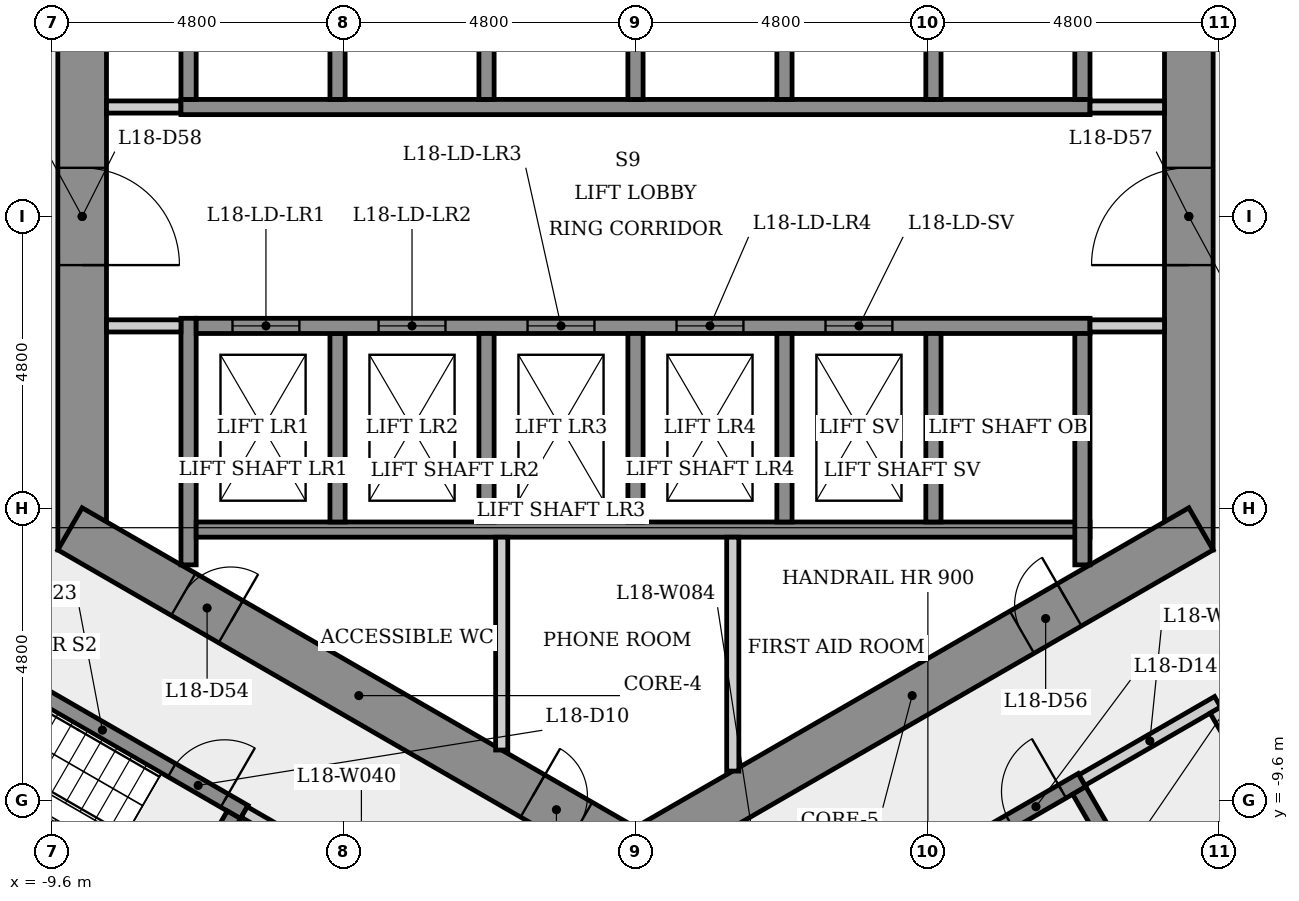
"""IFC4 building model, lengths in metres.
Left out: names, types, materials, properties, quantities, classifications, styles, units other than length and angle.
Written with IfcOpenShell. Run it as: python <this file> out.ifc"""

import sys

from ifc_helpers import new_model, si_unit, direction, frame, frame_2d, origin, place, context, subcontext, project, spatial, rectangle, extrude, element, fill, save


model = new_model("IFC4")
c1 = context("Model", 3, precision=1e-05, world=origin(), true_north=direction((0.0, 1.0)))
c2 = subcontext(c1, "Body", "Model", "MODEL_VIEW")
j1 = project(units=[si_unit("LENGTHUNIT", "METRE"), si_unit("PLANEANGLEUNIT", "RADIAN")], contexts=[c1])
p1 = place(None, origin())
s1 = spatial("IfcSite", under=j1, at=p1, CompositionType="ELEMENT")
p2 = place(p1, origin())
s2 = spatial("IfcBuilding", under=s1, at=p2, CompositionType="ELEMENT")
p3 = place(p2, frame((0.0, 0.0, 70.3)))
s3 = spatial("IfcBuildingStorey", under=s2, at=p3, CompositionType="ELEMENT", Elevation=70.3)
p4 = place(p3, frame((9.1, -5.485, 0.0), z_axis=(0.0, 0.0, 1.0), x_axis=(0.0, 1.0, 0.0)))
e1 = element("IfcWall", 1, at=p4, inside=s3, PredefinedType="SHEAR", context=c2, shape_type="SweptSolid", body=[
    extrude(rectangle(XDim=10.97, YDim=0.8, at=frame_2d((5.485, 0.0))), origin(), (0.0, 0.0, 1.0), 4.0),
])
p5 = place(p4, frame((4.685, 0.0, 0.0)))
e2 = element("IfcOpeningElement", 2, at=p5, cuts=e1, PredefinedType="OPENING", context=c2, shape_type="SweptSolid", body=[
    extrude(rectangle(XDim=1.6, YDim=2.1, at=frame_2d((0.8, 1.05))), frame((0.0, 0.41, 0.0), z_axis=(0.0, -1.0, 0.0), x_axis=(1.0, 0.0, 0.0)), (0.0, 0.0, 1.0), 0.82),
])
p6 = place(p3, frame((-9.1, 5.485, 0.0), z_axis=(0.0, 0.0, 1.0), x_axis=(0.0, -1.0, 0.0)))
e3 = element("IfcWall", 3, at=p6, inside=s3, PredefinedType="SHEAR", context=c2, shape_type="SweptSolid", body=[
    extrude(rectangle(XDim=10.97, YDim=0.8, at=frame_2d((5.485, 0.0))), origin(), (0.0, 0.0, 1.0), 4.0),
])
p7 = place(p6, frame((4.685, 0.0, 0.0)))
e4 = element("IfcOpeningElement", 4, at=p7, cuts=e3, PredefinedType="OPENING", context=c2, shape_type="SweptSolid", body=[
    extrude(rectangle(XDim=1.6, YDim=2.1, at=frame_2d((0.8, 1.05))), frame((0.0, 0.41, 0.0), z_axis=(0.0, -1.0, 0.0), x_axis=(1.0, 0.0, 0.0)), (0.0, 0.0, 1.0), 0.82),
])
p8 = place(p3, frame((-9.3, -5.138, 0.0), z_axis=(0.0, 0.0, 1.0), x_axis=(0.866023993627, -0.500002442456, 0.0)))
e5 = element("IfcWall", 5, at=p8, inside=s3, PredefinedType="SHEAR", context=c2, shape_type="SweptSolid", body=[
    extrude(rectangle(XDim=10.97, YDim=0.8, at=frame_2d((5.485, 0.0))), origin(), (0.0, 0.0, 1.0), 4.0),
])
p9 = place(p8, frame((2.153, 0.0, 0.0)))
e6 = element("IfcOpeningElement", 6, at=p9, cuts=e5, PredefinedType="OPENING", context=c2, shape_type="SweptSolid", body=[
    extrude(rectangle(XDim=0.9, YDim=2.1, at=frame_2d((0.45, 1.05))), frame((0.0, 0.41, 0.0), z_axis=(0.0, -1.0, 0.0), x_axis=(1.0, 0.0, 0.0)), (0.0, 0.0, 1.0), 0.82),
])
p10 = place(p8, frame((8.787, 0.0, 0.0)))
e7 = element("IfcOpeningElement", 7, at=p10, cuts=e5, PredefinedType="OPENING", context=c2, shape_type="SweptSolid", body=[
    extrude(rectangle(XDim=0.9, YDim=2.1, at=frame_2d((0.45, 1.05))), frame((0.0, 0.41, 0.0), z_axis=(0.0, -1.0, 0.0), x_axis=(1.0, 0.0, 0.0)), (0.0, 0.0, 1.0), 0.82),
])
p11 = place(p3, frame((-0.2, -10.623, 0.0), z_axis=(0.0, 0.0, 1.0), x_axis=(0.866023993627, 0.500002442456, 0.0)))
e8 = element("IfcWall", 8, at=p11, inside=s3, PredefinedType="SHEAR", context=c2, shape_type="SweptSolid", body=[
    extrude(rectangle(XDim=10.97, YDim=0.8, at=frame_2d((5.485, 0.0))), origin(), (0.0, 0.0, 1.0), 4.0),
])
p12 = place(p11, frame((7.57, 0.0, 0.0)))
e9 = element("IfcOpeningElement", 9, at=p12, cuts=e8, PredefinedType="OPENING", context=c2, shape_type="SweptSolid", body=[
    extrude(rectangle(XDim=0.9, YDim=2.1, at=frame_2d((0.45, 1.05))), frame((0.0, 0.41, 0.0), z_axis=(0.0, -1.0, 0.0), x_axis=(1.0, 0.0, 0.0)), (0.0, 0.0, 1.0), 0.82),
])
p13 = place(p3, frame((-11.1, -7.101, 0.0), z_axis=(0.0, 0.0, 1.0), x_axis=(0.866028615007, -0.499994437958, 0.0)))
e10 = element("IfcWall", 10, at=p13, inside=s3, PredefinedType="SHEAR", context=c2, shape_type="SweptSolid", body=[
    extrude(rectangle(XDim=5.387, YDim=0.25, at=frame_2d((2.694, 0.0))), origin(), (0.0, 0.0, 1.0), 3.6),
])
p14 = place(p13, frame((4.012, 0.0, 0.0)))
e11 = element("IfcOpeningElement", 11, at=p14, cuts=e10, PredefinedType="OPENING", context=c2, shape_type="SweptSolid", body=[
    extrude(rectangle(XDim=1.0, YDim=2.1, at=frame_2d((0.5, 1.05))), frame((0.0, 0.135, 0.0), z_axis=(0.0, -1.0, 0.0), x_axis=(1.0, 0.0, 0.0)), (0.0, 0.0, 1.0), 0.27),
])
p15 = place(p3, frame((-8.7, 1.8, 0.0), z_axis=(0.0, 0.0, 1.0), x_axis=(1.0, 0.0, 0.0)))
e12 = element("IfcWall", 12, at=p15, inside=s3, PredefinedType="PARTITIONING", context=c2, shape_type="SweptSolid", body=[
    extrude(rectangle(XDim=1.225, YDim=0.2, at=frame_2d((0.613, 0.0))), origin(), (0.0, 0.0, 1.0), 3.6),
])
p16 = place(p3, frame((-7.935, -12.393, 0.0), z_axis=(0.0, 0.0, 1.0), x_axis=(-0.866025499775, 0.499999833739, 0.0)))
e13 = element("IfcWall", 13, at=p16, inside=s3, PredefinedType="SHEAR", context=c2, shape_type="SweptSolid", body=[
    extrude(rectangle(XDim=6.4, YDim=0.25, at=frame_2d((3.2, 0.0))), origin(), (0.0, 0.0, 1.0), 3.6),
])
p17 = place(p3, frame((-7.475, 1.8, 0.0), z_axis=(0.0, 0.0, 1.0), x_axis=(1.0, 0.0, 0.0)))
e14 = element("IfcWall", 14, at=p17, inside=s3, PredefinedType="SHEAR", context=c2, shape_type="SweptSolid", body=[
    extrude(rectangle(XDim=14.95, YDim=0.25, at=frame_2d((7.475, 0.0))), origin(), (0.0, 0.0, 1.0), 3.6),
])
p18 = place(p3, frame((-7.35, -5.73, 0.0), z_axis=(0.0, 0.0, 1.0), x_axis=(0.0, 1.0, 0.0)))
e15 = element("IfcWall", 15, at=p18, inside=s3, PredefinedType="SHEAR", context=c2, shape_type="SweptSolid", body=[
    extrude(rectangle(XDim=4.055, YDim=0.25, at=frame_2d((2.028, 0.0))), origin(), (0.0, 0.0, 1.0), 3.6),
])
p19 = place(p3, frame((-7.35, 1.925, 0.0), z_axis=(0.0, 0.0, 1.0), x_axis=(0.0, 1.0, 0.0)))
e16 = element("IfcWall", 16, at=p19, inside=s3, PredefinedType="SHEAR", context=c2, shape_type="SweptSolid", body=[
    extrude(rectangle(XDim=3.805, YDim=0.25, at=frame_2d((1.903, 0.0))), origin(), (0.0, 0.0, 1.0), 3.6),
])
p20 = place(p3, frame((-7.475, -1.8, 0.0), z_axis=(0.0, 0.0, 1.0), x_axis=(-1.0, 0.0, 0.0)))
e17 = element("IfcWall", 17, at=p20, inside=s3, PredefinedType="PARTITIONING", context=c2, shape_type="SweptSolid", body=[
    extrude(rectangle(XDim=1.225, YDim=0.2, at=frame_2d((0.613, 0.0))), origin(), (0.0, 0.0, 1.0), 3.6),
])
p21 = place(p3, frame((-6.605, -9.841, 0.0), z_axis=(0.0, 0.0, 1.0), x_axis=(-0.499996545922, -0.866027397988, 0.0)))
e18 = element("IfcWall", 18, at=p21, inside=s3, PredefinedType="SHEAR", context=c2, shape_type="SweptSolid", body=[
    extrude(rectangle(XDim=2.75, YDim=0.25, at=frame_2d((1.375, 0.0))), origin(), (0.0, 0.0, 1.0), 3.6),
])
p22 = place(p21, frame((0.875, 0.0, 0.0)))
e19 = element("IfcOpeningElement", 19, at=p22, cuts=e18, PredefinedType="OPENING", context=c2, shape_type="SweptSolid", body=[
    extrude(rectangle(XDim=1.0, YDim=2.1, at=frame_2d((0.5, 1.05))), frame((0.0, 0.135, 0.0), z_axis=(0.0, -1.0, 0.0), x_axis=(1.0, 0.0, 0.0)), (0.0, 0.0, 1.0), 0.27),
])
p23 = place(p3, frame((-6.435, -9.795, 0.0), z_axis=(0.0, 0.0, 1.0), x_axis=(0.866012907634, -0.500021643343, 0.0)))
e20 = element("IfcWall", 20, at=p23, inside=s3, PredefinedType="PARTITIONING", context=c2, shape_type="SweptSolid", body=[
    extrude(rectangle(XDim=4.45, YDim=0.2, at=frame_2d((2.225, 0.0))), origin(), (0.0, 0.0, 1.0), 3.6),
])
p24 = place(p23, frame((1.675, 0.0, 0.0)))
e21 = element("IfcOpeningElement", 21, at=p24, cuts=e20, PredefinedType="OPENING", context=c2, shape_type="SweptSolid", body=[
    extrude(rectangle(XDim=1.1, YDim=2.1, at=frame_2d((0.55, 1.05))), frame((0.0, 0.11, 0.0), z_axis=(0.0, -1.0, 0.0), x_axis=(1.0, 0.0, 0.0)), (0.0, 0.0, 1.0), 0.22),
])
p25 = place(p3, frame((-7.225, -5.15, 0.0), z_axis=(0.0, 0.0, 1.0), x_axis=(1.0, 0.0, 0.0)))
e22 = element("IfcWall", 22, at=p25, inside=s3, PredefinedType="SHEAR", context=c2, shape_type="SweptSolid", body=[
    extrude(rectangle(XDim=14.7, YDim=0.25, at=frame_2d((7.35, 0.0))), origin(), (0.0, 0.0, 1.0), 3.6),
])
for number, where, z_axis, x_axis in (
    (23, (-4.9, -1.925, 0.0), (0.0, 0.0, 1.0), (0.0, -1.0, 0.0)),
    (24, (-4.9, 5.025, 0.0), (0.0, 0.0, 1.0), (0.0, -1.0, 0.0)),
):
    element("IfcWall", number, at=place(p3, frame(where, z_axis=z_axis, x_axis=x_axis)), inside=s3, PredefinedType="SHEAR", context=c2, shape_type="SweptSolid", body=[
        extrude(rectangle(XDim=3.1, YDim=0.25, at=frame_2d((1.55, 0.0))), origin(), (0.0, 0.0, 1.0), 4.0),
    ])
p26 = place(p3, frame((-7.225, -1.8, 0.0), z_axis=(0.0, 0.0, 1.0), x_axis=(1.0, 0.0, 0.0)))
e25 = element("IfcWall", 25, at=p26, inside=s3, PredefinedType="SHEAR", context=c2, shape_type="SweptSolid", body=[
    extrude(rectangle(XDim=14.7, YDim=0.25, at=frame_2d((7.35, 0.0))), origin(), (0.0, 0.0, 1.0), 3.6),
])
p27 = place(p26, frame((0.597, 0.0, 0.0)))
e26 = element("IfcOpeningElement", 26, at=p27, cuts=e25, PredefinedType="OPENING", context=c2, shape_type="SweptSolid", body=[
    extrude(rectangle(XDim=1.1, YDim=2.1, at=frame_2d((0.55, 1.05))), frame((0.0, 0.135, 0.0), z_axis=(0.0, -1.0, 0.0), x_axis=(1.0, 0.0, 0.0)), (0.0, 0.0, 1.0), 0.27),
])
p28 = place(p26, frame((3.0, 0.0, 0.0)))
e27 = element("IfcOpeningElement", 27, at=p28, cuts=e25, PredefinedType="OPENING", context=c2, shape_type="SweptSolid", body=[
    extrude(rectangle(XDim=1.1, YDim=2.1, at=frame_2d((0.55, 1.05))), frame((0.0, 0.135, 0.0), z_axis=(0.0, -1.0, 0.0), x_axis=(1.0, 0.0, 0.0)), (0.0, 0.0, 1.0), 0.27),
])
p29 = place(p26, frame((5.45, 0.0, 0.0)))
e28 = element("IfcOpeningElement", 28, at=p29, cuts=e25, PredefinedType="OPENING", context=c2, shape_type="SweptSolid", body=[
    extrude(rectangle(XDim=1.1, YDim=2.1, at=frame_2d((0.55, 1.05))), frame((0.0, 0.135, 0.0), z_axis=(0.0, -1.0, 0.0), x_axis=(1.0, 0.0, 0.0)), (0.0, 0.0, 1.0), 0.27),
])
p30 = place(p26, frame((7.9, 0.0, 0.0)))
e29 = element("IfcOpeningElement", 29, at=p30, cuts=e25, PredefinedType="OPENING", context=c2, shape_type="SweptSolid", body=[
    extrude(rectangle(XDim=1.1, YDim=2.1, at=frame_2d((0.55, 1.05))), frame((0.0, 0.135, 0.0), z_axis=(0.0, -1.0, 0.0), x_axis=(1.0, 0.0, 0.0)), (0.0, 0.0, 1.0), 0.27),
])
p31 = place(p26, frame((10.35, 0.0, 0.0)))
e30 = element("IfcOpeningElement", 30, at=p31, cuts=e25, PredefinedType="OPENING", context=c2, shape_type="SweptSolid", body=[
    extrude(rectangle(XDim=1.1, YDim=2.1, at=frame_2d((0.55, 1.05))), frame((0.0, 0.135, 0.0), z_axis=(0.0, -1.0, 0.0), x_axis=(1.0, 0.0, 0.0)), (0.0, 0.0, 1.0), 0.27),
])
for number, where, z_axis, x_axis in (
    (31, (-2.45, -1.925, 0.0), (0.0, 0.0, 1.0), (0.0, -1.0, 0.0)),
    (32, (-2.45, 5.025, 0.0), (0.0, 0.0, 1.0), (0.0, -1.0, 0.0)),
):
    element("IfcWall", number, at=place(p3, frame(where, z_axis=z_axis, x_axis=x_axis)), inside=s3, PredefinedType="SHEAR", context=c2, shape_type="SweptSolid", body=[
        extrude(rectangle(XDim=3.1, YDim=0.25, at=frame_2d((1.55, 0.0))), origin(), (0.0, 0.0, 1.0), 4.0),
    ])
p32 = place(p3, frame((-2.2, -5.275, 0.0), z_axis=(0.0, 0.0, 1.0), x_axis=(0.0, -1.0, 0.0)))
e33 = element("IfcWall", 33, at=p32, inside=s3, PredefinedType="PARTITIONING", context=c2, shape_type="SweptSolid", body=[
    extrude(rectangle(XDim=3.501, YDim=0.2, at=frame_2d((1.75, 0.0))), origin(), (0.0, 0.0, 1.0), 3.6),
])
for number, where, z_axis, x_axis in (
    (34, (0.0, -1.925, 0.0), (0.0, 0.0, 1.0), (0.0, -1.0, 0.0)),
    (35, (0.0, 5.025, 0.0), (0.0, 0.0, 1.0), (0.0, -1.0, 0.0)),
):
    element("IfcWall", number, at=place(p3, frame(where, z_axis=z_axis, x_axis=x_axis)), inside=s3, PredefinedType="SHEAR", context=c2, shape_type="SweptSolid", body=[
        extrude(rectangle(XDim=3.1, YDim=0.25, at=frame_2d((1.55, 0.0))), origin(), (0.0, 0.0, 1.0), 4.0),
    ])
p33 = place(p3, frame((1.6, -5.275, 0.0), z_axis=(0.0, 0.0, 1.0), x_axis=(0.0, -1.0, 0.0)))
e36 = element("IfcWall", 36, at=p33, inside=s3, PredefinedType="PARTITIONING", context=c2, shape_type="SweptSolid", body=[
    extrude(rectangle(XDim=3.847, YDim=0.2, at=frame_2d((1.924, 0.0))), origin(), (0.0, 0.0, 1.0), 3.6),
])
p34 = place(p3, frame((1.585, -12.595, 0.0), z_axis=(0.0, 0.0, 1.0), x_axis=(0.866036417653, 0.499980922934, 0.0)))
e37 = element("IfcWall", 37, at=p34, inside=s3, PredefinedType="SHEAR", context=c2, shape_type="SweptSolid", body=[
    extrude(rectangle(XDim=6.65, YDim=0.25, at=frame_2d((3.325, 0.0))), origin(), (0.0, 0.0, 1.0), 3.6),
])
p35 = place(p34, frame((5.275, 0.0, 0.0)))
e38 = element("IfcOpeningElement", 38, at=p35, cuts=e37, PredefinedType="OPENING", context=c2, shape_type="SweptSolid", body=[
    extrude(rectangle(XDim=1.0, YDim=2.1, at=frame_2d((0.5, 1.05))), frame((0.0, 0.135, 0.0), z_axis=(0.0, -1.0, 0.0), x_axis=(1.0, 0.0, 0.0)), (0.0, 0.0, 1.0), 0.27),
])
for number, where, z_axis, x_axis in (
    (39, (2.45, -1.925, 0.0), (0.0, 0.0, 1.0), (0.0, -1.0, 0.0)),
    (40, (2.45, 5.025, 0.0), (0.0, 0.0, 1.0), (0.0, -1.0, 0.0)),
    (41, (4.9, -1.925, 0.0), (0.0, 0.0, 1.0), (0.0, -1.0, 0.0)),
    (42, (4.9, 5.025, 0.0), (0.0, 0.0, 1.0), (0.0, -1.0, 0.0)),
):
    element("IfcWall", number, at=place(p3, frame(where, z_axis=z_axis, x_axis=x_axis)), inside=s3, PredefinedType="SHEAR", context=c2, shape_type="SweptSolid", body=[
        extrude(rectangle(XDim=3.1, YDim=0.25, at=frame_2d((1.55, 0.0))), origin(), (0.0, 0.0, 1.0), 4.0),
    ])
p36 = place(p3, frame((7.298, -9.441, 0.0), z_axis=(0.0, 0.0, 1.0), x_axis=(0.500034990121, -0.866005201286, 0.0)))
e43 = element("IfcWall", 43, at=p36, inside=s3, PredefinedType="SHEAR", context=c2, shape_type="SweptSolid", body=[
    extrude(rectangle(XDim=2.75, YDim=0.25, at=frame_2d((1.375, 0.0))), origin(), (0.0, 0.0, 1.0), 3.6),
])
p37 = place(p36, frame((0.875, 0.0, 0.0)))
e44 = element("IfcOpeningElement", 44, at=p37, cuts=e43, PredefinedType="OPENING", context=c2, shape_type="SweptSolid", body=[
    extrude(rectangle(XDim=1.0, YDim=2.1, at=frame_2d((0.5, 1.05))), frame((0.0, 0.135, 0.0), z_axis=(0.0, -1.0, 0.0), x_axis=(1.0, 0.0, 0.0)), (0.0, 0.0, 1.0), 0.27),
])
p38 = place(p3, frame((7.344, -9.27, 0.0), z_axis=(0.0, 0.0, 1.0), x_axis=(0.866005588531, 0.500034319456, 0.0)))
e45 = element("IfcWall", 45, at=p38, inside=s3, PredefinedType="PARTITIONING", context=c2, shape_type="SweptSolid", body=[
    extrude(rectangle(XDim=2.575, YDim=0.2, at=frame_2d((1.288, 0.0))), origin(), (0.0, 0.0, 1.0), 3.6),
])
p39 = place(p3, frame((7.475, 1.8, 0.0), z_axis=(0.0, 0.0, 1.0), x_axis=(1.0, 0.0, 0.0)))
e46 = element("IfcWall", 46, at=p39, inside=s3, PredefinedType="PARTITIONING", context=c2, shape_type="SweptSolid", body=[
    extrude(rectangle(XDim=1.225, YDim=0.2, at=frame_2d((0.613, 0.0))), origin(), (0.0, 0.0, 1.0), 3.6),
])
for number, where, z_axis, x_axis in (
    (47, (7.35, -1.925, 0.0), (0.0, 0.0, 1.0), (0.0, -1.0, 0.0)),
    (48, (7.35, 5.73, 0.0), (0.0, 0.0, 1.0), (0.0, -1.0, 0.0)),
):
    element("IfcWall", number, at=place(p3, frame(where, z_axis=z_axis, x_axis=x_axis)), inside=s3, PredefinedType="SHEAR", context=c2, shape_type="SweptSolid", body=[
        extrude(rectangle(XDim=3.805, YDim=0.25, at=frame_2d((1.903, 0.0))), origin(), (0.0, 0.0, 1.0), 3.6),
    ])
p40 = place(p3, frame((8.7, -1.8, 0.0), z_axis=(0.0, 0.0, 1.0), x_axis=(-1.0, 0.0, 0.0)))
e49 = element("IfcWall", 49, at=p40, inside=s3, PredefinedType="PARTITIONING", context=c2, shape_type="SweptSolid", body=[
    extrude(rectangle(XDim=1.225, YDim=0.2, at=frame_2d((0.613, 0.0))), origin(), (0.0, 0.0, 1.0), 3.6),
])
p41 = place(p3, frame((9.537, -8.119, 0.0), z_axis=(0.0, 0.0, 1.0), x_axis=(0.499990139034, -0.866031096941, 0.0)))
e50 = element("IfcWall", 50, at=p41, inside=s3, PredefinedType="PARTITIONING", context=c2, shape_type="SweptSolid", body=[
    extrude(rectangle(XDim=3.0, YDim=0.2, at=frame_2d((1.5, 0.0))), origin(), (0.0, 0.0, 1.0), 3.6),
])
p42 = place(p41, frame((0.935, 0.0, 0.0)))
e51 = element("IfcOpeningElement", 51, at=p42, cuts=e50, PredefinedType="OPENING", context=c2, shape_type="SweptSolid", body=[
    extrude(rectangle(XDim=1.0, YDim=2.1, at=frame_2d((0.5, 1.05))), frame((0.0, 0.11, 0.0), z_axis=(0.0, -1.0, 0.0), x_axis=(1.0, 0.0, 0.0)), (0.0, 0.0, 1.0), 0.22),
])
p43 = place(p27, origin())
e52 = element("IfcDoor", 52, at=p43, inside=s3, OperationType="SLIDING_TO_LEFT", PredefinedType="DOOR", context=c2, shape_type="SweptSolid", body=[
    extrude(rectangle(XDim=1.1, YDim=2.1, at=frame_2d((0.55, 1.05))), frame((0.0, 0.025, 0.0), z_axis=(0.0, -1.0, 0.0), x_axis=(1.0, 0.0, 0.0)), (0.0, 0.0, 1.0), 0.05),
])
fill(e26, e52)
p44 = place(p28, origin())
e53 = element("IfcDoor", 53, at=p44, inside=s3, OperationType="SLIDING_TO_LEFT", PredefinedType="DOOR", context=c2, shape_type="SweptSolid", body=[
    extrude(rectangle(XDim=1.1, YDim=2.1, at=frame_2d((0.55, 1.05))), frame((0.0, 0.025, 0.0), z_axis=(0.0, -1.0, 0.0), x_axis=(1.0, 0.0, 0.0)), (0.0, 0.0, 1.0), 0.05),
])
fill(e27, e53)
p45 = place(p29, origin())
e54 = element("IfcDoor", 54, at=p45, inside=s3, OperationType="SLIDING_TO_LEFT", PredefinedType="DOOR", context=c2, shape_type="SweptSolid", body=[
    extrude(rectangle(XDim=1.1, YDim=2.1, at=frame_2d((0.55, 1.05))), frame((0.0, 0.025, 0.0), z_axis=(0.0, -1.0, 0.0), x_axis=(1.0, 0.0, 0.0)), (0.0, 0.0, 1.0), 0.05),
])
fill(e28, e54)
p46 = place(p30, origin())
e55 = element("IfcDoor", 55, at=p46, inside=s3, OperationType="SLIDING_TO_LEFT", PredefinedType="DOOR", context=c2, shape_type="SweptSolid", body=[
    extrude(rectangle(XDim=1.1, YDim=2.1, at=frame_2d((0.55, 1.05))), frame((0.0, 0.025, 0.0), z_axis=(0.0, -1.0, 0.0), x_axis=(1.0, 0.0, 0.0)), (0.0, 0.0, 1.0), 0.05),
])
fill(e29, e55)
p47 = place(p31, origin())
e56 = element("IfcDoor", 56, at=p47, inside=s3, OperationType="SLIDING_TO_LEFT", PredefinedType="DOOR", context=c2, shape_type="SweptSolid", body=[
    extrude(rectangle(XDim=1.1, YDim=2.1, at=frame_2d((0.55, 1.05))), frame((0.0, 0.025, 0.0), z_axis=(0.0, -1.0, 0.0), x_axis=(1.0, 0.0, 0.0)), (0.0, 0.0, 1.0), 0.05),
])
fill(e30, e56)
p48 = place(p14, origin())
e57 = element("IfcDoor", 57, at=p48, inside=s3, OperationType="SINGLE_SWING_RIGHT", PredefinedType="DOOR", context=c2, shape_type="SweptSolid", body=[
    extrude(rectangle(XDim=1.0, YDim=2.1, at=frame_2d((0.5, 1.05))), frame((0.0, 0.025, 0.0), z_axis=(0.0, -1.0, 0.0), x_axis=(1.0, 0.0, 0.0)), (0.0, 0.0, 1.0), 0.05),
])
fill(e11, e57)
p49 = place(p35, origin())
e58 = element("IfcDoor", 58, at=p49, inside=s3, OperationType="SINGLE_SWING_RIGHT", PredefinedType="DOOR", context=c2, shape_type="SweptSolid", body=[
    extrude(rectangle(XDim=1.0, YDim=2.1, at=frame_2d((0.5, 1.05))), frame((0.0, 0.025, 0.0), z_axis=(0.0, -1.0, 0.0), x_axis=(1.0, 0.0, 0.0)), (0.0, 0.0, 1.0), 0.05),
])
fill(e38, e58)
p50 = place(p9, origin())
e59 = element("IfcDoor", 59, at=p50, inside=s3, OperationType="SINGLE_SWING_RIGHT", PredefinedType="DOOR", context=c2, shape_type="SweptSolid", body=[
    extrude(rectangle(XDim=0.9, YDim=2.1, at=frame_2d((0.45, 1.05))), frame((0.0, 0.025, 0.0), z_axis=(0.0, -1.0, 0.0), x_axis=(1.0, 0.0, 0.0)), (0.0, 0.0, 1.0), 0.05),
])
fill(e6, e59)
p51 = place(p10, origin())
e60 = element("IfcDoor", 60, at=p51, inside=s3, OperationType="SINGLE_SWING_LEFT", PredefinedType="DOOR", context=c2, shape_type="SweptSolid", body=[
    extrude(rectangle(XDim=0.9, YDim=2.1, at=frame_2d((0.45, 1.05))), frame((0.0, 0.025, 0.0), z_axis=(0.0, -1.0, 0.0), x_axis=(1.0, 0.0, 0.0)), (0.0, 0.0, 1.0), 0.05),
])
fill(e7, e60)
p52 = place(p12, origin())
e61 = element("IfcDoor", 61, at=p52, inside=s3, OperationType="SINGLE_SWING_RIGHT", PredefinedType="DOOR", context=c2, shape_type="SweptSolid", body=[
    extrude(rectangle(XDim=0.9, YDim=2.1, at=frame_2d((0.45, 1.05))), frame((0.0, 0.025, 0.0), z_axis=(0.0, -1.0, 0.0), x_axis=(1.0, 0.0, 0.0)), (0.0, 0.0, 1.0), 0.05),
])
fill(e9, e61)
p53 = place(p5, origin())
e62 = element("IfcDoor", 62, at=p53, inside=s3, OperationType="SINGLE_SWING_LEFT", PredefinedType="DOOR", context=c2, shape_type="SweptSolid", body=[
    extrude(rectangle(XDim=1.6, YDim=2.1, at=frame_2d((0.8, 1.05))), frame((0.0, 0.025, 0.0), z_axis=(0.0, -1.0, 0.0), x_axis=(1.0, 0.0, 0.0)), (0.0, 0.0, 1.0), 0.05),
])
fill(e2, e62)
p54 = place(p7, origin())
e63 = element("IfcDoor", 63, at=p54, inside=s3, OperationType="SINGLE_SWING_RIGHT", PredefinedType="DOOR", context=c2, shape_type="SweptSolid", body=[
    extrude(rectangle(XDim=1.6, YDim=2.1, at=frame_2d((0.8, 1.05))), frame((0.0, 0.025, 0.0), z_axis=(0.0, -1.0, 0.0), x_axis=(1.0, 0.0, 0.0)), (0.0, 0.0, 1.0), 0.05),
])
fill(e4, e63)
save(model, sys.argv[1])
